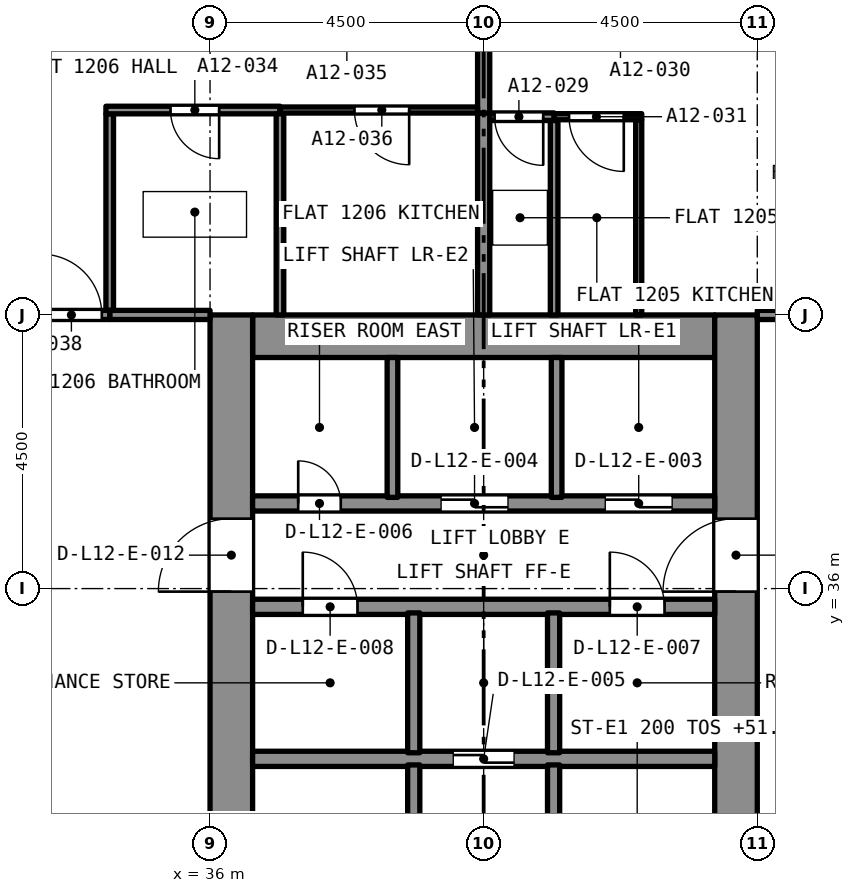
"""IFC4 building model, lengths in metres.
Left out: names, types, materials, properties, quantities, classifications, styles, units other than length and angle.
Written with IfcOpenShell. Run it as: python <this file> out.ifc"""

import sys

from ifc_helpers import new_model, si_unit, direction, frame, frame_2d, origin, place, context, subcontext, project, spatial, rectangle, extrude, element, fill, save


model = new_model("IFC4")
c1 = context("Model", 3, precision=1e-05, world=origin(), true_north=direction((0.0, 1.0)))
c2 = subcontext(c1, "Body", "Model", "MODEL_VIEW")
j1 = project(units=[si_unit("LENGTHUNIT", "METRE"), si_unit("PLANEANGLEUNIT", "RADIAN")], contexts=[c1])
p1 = place(None, origin())
s1 = spatial("IfcSite", under=j1, at=p1, CompositionType="ELEMENT")
p2 = place(p1, origin())
s2 = spatial("IfcBuilding", under=s1, at=p2, CompositionType="ELEMENT")
p3 = place(p2, frame((0.0, 0.0, 49.6)))
s3 = spatial("IfcBuildingStorey", under=s2, at=p3, CompositionType="ELEMENT", Elevation=49.6)
p4 = place(p3, frame((36.7, 40.15, 0.0), z_axis=(0.0, 0.0, 1.0), x_axis=(1.0, 0.0, 0.0)))
e1 = element("IfcWall", 1, at=p4, inside=s3, PredefinedType="SOLIDWALL", context=c2, shape_type="SweptSolid", body=[
    extrude(rectangle(XDim=7.6, YDim=0.7, at=frame_2d((3.8, 0.0))), origin(), (0.0, 0.0, 1.0), 3.2),
])
p5 = place(p3, frame((36.35, 27.0, 0.0), z_axis=(0.0, 0.0, 1.0), x_axis=(0.0, 1.0, 0.0)))
e2 = element("IfcWall", 2, at=p5, inside=s3, PredefinedType="SOLIDWALL", context=c2, shape_type="SweptSolid", body=[
    extrude(rectangle(XDim=13.5, YDim=0.7, at=frame_2d((6.75, 0.0))), origin(), (0.0, 0.0, 1.0), 3.2),
])
p6 = place(p5, frame((8.95, 0.0, 0.0)))
e3 = element("IfcOpeningElement", 3, at=p6, cuts=e2, PredefinedType="OPENING", context=c2, shape_type="SweptSolid", body=[
    extrude(rectangle(XDim=1.2, YDim=2.1, at=frame_2d((0.6, 1.05))), frame((0.0, 0.36, 0.0), z_axis=(0.0, -1.0, 0.0), x_axis=(1.0, 0.0, 0.0)), (0.0, 0.0, 1.0), 0.72),
])
p7 = place(p3, frame((44.65, 27.0, 0.0), z_axis=(0.0, 0.0, 1.0), x_axis=(0.0, 1.0, 0.0)))
e4 = element("IfcWall", 4, at=p7, inside=s3, PredefinedType="SOLIDWALL", context=c2, shape_type="SweptSolid", body=[
    extrude(rectangle(XDim=13.5, YDim=0.7, at=frame_2d((6.75, 0.0))), origin(), (0.0, 0.0, 1.0), 3.2),
])
p8 = place(p7, frame((8.95, 0.0, 0.0)))
e5 = element("IfcOpeningElement", 5, at=p8, cuts=e4, PredefinedType="OPENING", context=c2, shape_type="SweptSolid", body=[
    extrude(rectangle(XDim=1.2, YDim=2.1, at=frame_2d((0.6, 1.05))), frame((0.0, 0.36, 0.0), z_axis=(0.0, -1.0, 0.0), x_axis=(1.0, 0.0, 0.0)), (0.0, 0.0, 1.0), 0.72),
])
p9 = place(p3, frame((41.659, 43.76, 0.0), z_axis=(0.0, 0.0, 1.0), x_axis=(-1.0, 0.0, 0.0)))
e6 = element("IfcWall", 6, at=p9, inside=s3, PredefinedType="PARTITIONING", context=c2, shape_type="SweptSolid", body=[
    extrude(rectangle(XDim=1.059, YDim=0.125, at=frame_2d((0.53, 0.0))), origin(), (0.0, 0.0, 1.0), 2.9),
])
p10 = place(p9, frame((0.179, 0.0, 0.0)))
e7 = element("IfcOpeningElement", 7, at=p10, cuts=e6, PredefinedType="OPENING", context=c2, shape_type="SweptSolid", body=[
    extrude(rectangle(XDim=0.8, YDim=2.1, at=frame_2d((0.4, 1.05))), frame((0.0, 0.073, 0.0), z_axis=(0.0, -1.0, 0.0), x_axis=(1.0, 0.0, 0.0)), (0.0, 0.0, 1.0), 0.145),
])
p11 = place(p3, frame((41.659, 40.5, 0.0), z_axis=(0.0, 0.0, 1.0), x_axis=(0.0, 1.0, 0.0)))
e8 = element("IfcWall", 8, at=p11, inside=s3, PredefinedType="PARTITIONING", context=c2, shape_type="SweptSolid", body=[
    extrude(rectangle(XDim=3.198, YDim=0.125, at=frame_2d((1.599, 0.0))), origin(), (0.0, 0.0, 1.0), 2.9),
])
p12 = place(p3, frame((40.5, 40.5, 0.0), z_axis=(0.0, 0.0, 1.0), x_axis=(0.0, 1.0, 0.0)))
e9 = element("IfcWall", 9, at=p12, inside=s3, PredefinedType="PARTITIONING", context=c2, shape_type="SweptSolid", body=[
    extrude(rectangle(XDim=3.323, YDim=0.2, at=frame_2d((1.661, 0.0))), origin(), (0.0, 0.0, 1.0), 2.9),
])
p13 = place(p3, frame((43.05, 40.5, 0.0), z_axis=(0.0, 0.0, 1.0), x_axis=(0.0, 1.0, 0.0)))
e10 = element("IfcWall", 10, at=p13, inside=s3, PredefinedType="PARTITIONING", context=c2, shape_type="SweptSolid", body=[
    extrude(rectangle(XDim=3.21, YDim=0.1, at=frame_2d((1.605, 0.0))), origin(), (0.0, 0.0, 1.0), 2.9),
])
p14 = place(p3, frame((43.1, 43.76, 0.0), z_axis=(0.0, 0.0, 1.0), x_axis=(-1.0, 0.0, 0.0)))
e11 = element("IfcWall", 11, at=p14, inside=s3, PredefinedType="PARTITIONING", context=c2, shape_type="SweptSolid", body=[
    extrude(rectangle(XDim=1.441, YDim=0.1, at=frame_2d((0.72, 0.0))), origin(), (0.0, 0.0, 1.0), 2.9),
])
p15 = place(p14, frame((0.295, 0.0, 0.0)))
e12 = element("IfcOpeningElement", 12, at=p15, cuts=e11, PredefinedType="OPENING", context=c2, shape_type="SweptSolid", body=[
    extrude(rectangle(XDim=0.9, YDim=2.1, at=frame_2d((0.45, 1.05))), frame((0.0, 0.06, 0.0), z_axis=(0.0, -1.0, 0.0), x_axis=(1.0, 0.0, 0.0)), (0.0, 0.0, 1.0), 0.12),
])
p16 = place(p3, frame((40.5, 43.82, 0.0), z_axis=(0.0, 0.0, 1.0), x_axis=(0.0, 1.0, 0.0)))
e13 = element("IfcWall", 13, at=p16, inside=s3, PredefinedType="PARTITIONING", context=c2, shape_type="SweptSolid", body=[
    extrude(rectangle(XDim=1.23, YDim=0.2, at=frame_2d((0.615, 0.0))), origin(), (0.0, 0.0, 1.0), 2.9),
])
p17 = place(p3, frame((45.0, 40.5, 0.0), z_axis=(0.0, 0.0, 1.0), x_axis=(1.0, 0.0, 0.0)))
e14 = element("IfcWall", 14, at=p17, inside=s3, PredefinedType="PARTITIONING", context=c2, shape_type="SweptSolid", body=[
    extrude(rectangle(XDim=3.8, YDim=0.15, at=frame_2d((1.9, 0.0))), origin(), (0.0, 0.0, 1.0), 2.9),
])
p18 = place(p17, frame((1.75, 0.0, 0.0)))
e15 = element("IfcOpeningElement", 15, at=p18, cuts=e14, PredefinedType="OPENING", context=c2, shape_type="SweptSolid", body=[
    extrude(rectangle(XDim=1.0, YDim=2.1, at=frame_2d((0.5, 1.05))), frame((0.0, 0.085, 0.0), z_axis=(0.0, -1.0, 0.0), x_axis=(1.0, 0.0, 0.0)), (0.0, 0.0, 1.0), 0.17),
])
p19 = place(p3, frame((34.35, 40.575, 0.0), z_axis=(0.0, 0.0, 1.0), x_axis=(0.0, 1.0, 0.0)))
e16 = element("IfcWall", 16, at=p19, inside=s3, PredefinedType="PARTITIONING", context=c2, shape_type="SweptSolid", body=[
    extrude(rectangle(XDim=3.233, YDim=0.125, at=frame_2d((1.616, 0.0))), origin(), (0.0, 0.0, 1.0), 2.9),
])
p20 = place(p3, frame((37.15, 43.87, 0.0), z_axis=(0.0, 0.0, 1.0), x_axis=(-1.0, 0.0, 0.0)))
e17 = element("IfcWall", 17, at=p20, inside=s3, PredefinedType="PARTITIONING", context=c2, shape_type="SweptSolid", body=[
    extrude(rectangle(XDim=2.862, YDim=0.125, at=frame_2d((1.431, 0.0))), origin(), (0.0, 0.0, 1.0), 2.9),
])
p21 = place(p20, frame((1.0, 0.0, 0.0)))
e18 = element("IfcOpeningElement", 18, at=p21, cuts=e17, PredefinedType="OPENING", context=c2, shape_type="SweptSolid", body=[
    extrude(rectangle(XDim=0.8, YDim=2.1, at=frame_2d((0.4, 1.05))), frame((0.0, 0.073, 0.0), z_axis=(0.0, -1.0, 0.0), x_axis=(1.0, 0.0, 0.0)), (0.0, 0.0, 1.0), 0.145),
])
p22 = place(p3, frame((37.15, 40.5, 0.0), z_axis=(0.0, 0.0, 1.0), x_axis=(0.0, 1.0, 0.0)))
e19 = element("IfcWall", 19, at=p22, inside=s3, PredefinedType="PARTITIONING", context=c2, shape_type="SweptSolid", body=[
    extrude(rectangle(XDim=3.308, YDim=0.125, at=frame_2d((1.654, 0.0))), origin(), (0.0, 0.0, 1.0), 2.9),
])
p23 = place(p3, frame((34.35, 40.5, 0.0), z_axis=(0.0, 0.0, 1.0), x_axis=(1.0, 0.0, 0.0)))
e20 = element("IfcWall", 20, at=p23, inside=s3, PredefinedType="PARTITIONING", context=c2, shape_type="SweptSolid", body=[
    extrude(rectangle(XDim=1.65, YDim=0.15, at=frame_2d((0.825, 0.0))), origin(), (0.0, 0.0, 1.0), 2.9),
])
p24 = place(p3, frame((40.4, 43.87, 0.0), z_axis=(0.0, 0.0, 1.0), x_axis=(-1.0, 0.0, 0.0)))
e21 = element("IfcWall", 21, at=p24, inside=s3, PredefinedType="PARTITIONING", context=c2, shape_type="SweptSolid", body=[
    extrude(rectangle(XDim=3.25, YDim=0.1, at=frame_2d((1.625, 0.0))), origin(), (0.0, 0.0, 1.0), 2.9),
])
p25 = place(p24, frame((1.125, 0.0, 0.0)))
e22 = element("IfcOpeningElement", 22, at=p25, cuts=e21, PredefinedType="OPENING", context=c2, shape_type="SweptSolid", body=[
    extrude(rectangle(XDim=0.9, YDim=2.1, at=frame_2d((0.45, 1.05))), frame((0.0, 0.06, 0.0), z_axis=(0.0, -1.0, 0.0), x_axis=(1.0, 0.0, 0.0)), (0.0, 0.0, 1.0), 0.12),
])
p26 = place(p3, frame((32.2, 40.5, 0.0), z_axis=(0.0, 0.0, 1.0), x_axis=(1.0, 0.0, 0.0)))
e23 = element("IfcWall", 23, at=p26, inside=s3, PredefinedType="PARTITIONING", context=c2, shape_type="SweptSolid", body=[
    extrude(rectangle(XDim=2.15, YDim=0.15, at=frame_2d((1.075, 0.0))), origin(), (0.0, 0.0, 1.0), 2.9),
])
p27 = place(p26, frame((1.02, 0.0, 0.0)))
e24 = element("IfcOpeningElement", 24, at=p27, cuts=e23, PredefinedType="OPENING", context=c2, shape_type="SweptSolid", body=[
    extrude(rectangle(XDim=1.0, YDim=2.1, at=frame_2d((0.5, 1.05))), frame((0.0, 0.085, 0.0), z_axis=(0.0, -1.0, 0.0), x_axis=(1.0, 0.0, 0.0)), (0.0, 0.0, 1.0), 0.17),
])
p28 = place(p3, frame((36.7, 33.2, 0.0), z_axis=(0.0, 0.0, 1.0), x_axis=(1.0, 0.0, 0.0)))
e25 = element("IfcWall", 25, at=p28, inside=s3, PredefinedType="SOLIDWALL", context=c2, shape_type="SweptSolid", body=[
    extrude(rectangle(XDim=7.6, YDim=0.25, at=frame_2d((3.8, 0.0))), origin(), (0.0, 0.0, 1.0), 2.9),
])
p29 = place(p28, frame((3.3, 0.0, 0.0)))
e26 = element("IfcOpeningElement", 26, at=p29, cuts=e25, PredefinedType="OPENING", context=c2, shape_type="SweptSolid", body=[
    extrude(rectangle(XDim=1.0, YDim=2.1, at=frame_2d((0.5, 1.05))), frame((0.0, 0.135, 0.0), z_axis=(0.0, -1.0, 0.0), x_axis=(1.0, 0.0, 0.0)), (0.0, 0.0, 1.0), 0.27),
])
p30 = place(p3, frame((36.7, 35.7, 0.0), z_axis=(0.0, 0.0, 1.0), x_axis=(1.0, 0.0, 0.0)))
e27 = element("IfcWall", 27, at=p30, inside=s3, PredefinedType="SOLIDWALL", context=c2, shape_type="SweptSolid", body=[
    extrude(rectangle(XDim=7.6, YDim=0.25, at=frame_2d((3.8, 0.0))), origin(), (0.0, 0.0, 1.0), 2.9),
])
p31 = place(p30, frame((5.875, 0.0, 0.0)))
e28 = element("IfcOpeningElement", 28, at=p31, cuts=e27, PredefinedType="OPENING", context=c2, shape_type="SweptSolid", body=[
    extrude(rectangle(XDim=0.9, YDim=2.1, at=frame_2d((0.45, 1.05))), frame((0.0, 0.135, 0.0), z_axis=(0.0, -1.0, 0.0), x_axis=(1.0, 0.0, 0.0)), (0.0, 0.0, 1.0), 0.27),
])
p32 = place(p30, frame((0.825, 0.0, 0.0)))
e29 = element("IfcOpeningElement", 29, at=p32, cuts=e27, PredefinedType="OPENING", context=c2, shape_type="SweptSolid", body=[
    extrude(rectangle(XDim=0.9, YDim=2.1, at=frame_2d((0.45, 1.05))), frame((0.0, 0.135, 0.0), z_axis=(0.0, -1.0, 0.0), x_axis=(1.0, 0.0, 0.0)), (0.0, 0.0, 1.0), 0.27),
])
p33 = place(p3, frame((36.7, 37.4, 0.0), z_axis=(0.0, 0.0, 1.0), x_axis=(1.0, 0.0, 0.0)))
e30 = element("IfcWall", 30, at=p33, inside=s3, PredefinedType="SOLIDWALL", context=c2, shape_type="SweptSolid", body=[
    extrude(rectangle(XDim=7.6, YDim=0.25, at=frame_2d((3.8, 0.0))), origin(), (0.0, 0.0, 1.0), 2.9),
])
p34 = place(p33, frame((5.8, 0.0, 0.0)))
e31 = element("IfcOpeningElement", 31, at=p34, cuts=e30, PredefinedType="OPENING", context=c2, shape_type="SweptSolid", body=[
    extrude(rectangle(XDim=1.1, YDim=2.4, at=frame_2d((0.55, 1.2))), frame((0.0, 0.135, 0.0), z_axis=(0.0, -1.0, 0.0), x_axis=(1.0, 0.0, 0.0)), (0.0, 0.0, 1.0), 0.27),
])
p35 = place(p33, frame((3.1, 0.0, 0.0)))
e32 = element("IfcOpeningElement", 32, at=p35, cuts=e30, PredefinedType="OPENING", context=c2, shape_type="SweptSolid", body=[
    extrude(rectangle(XDim=1.1, YDim=2.4, at=frame_2d((0.55, 1.2))), frame((0.0, 0.135, 0.0), z_axis=(0.0, -1.0, 0.0), x_axis=(1.0, 0.0, 0.0)), (0.0, 0.0, 1.0), 0.27),
])
p36 = place(p33, frame((0.75, 0.0, 0.0)))
e33 = element("IfcOpeningElement", 33, at=p36, cuts=e30, PredefinedType="OPENING", context=c2, shape_type="SweptSolid", body=[
    extrude(rectangle(XDim=0.7, YDim=2.1, at=frame_2d((0.35, 1.05))), frame((0.0, 0.135, 0.0), z_axis=(0.0, -1.0, 0.0), x_axis=(1.0, 0.0, 0.0)), (0.0, 0.0, 1.0), 0.27),
])
p37 = place(p3, frame((41.65, 27.7, 0.0), z_axis=(0.0, 0.0, 1.0), x_axis=(0.0, 1.0, 0.0)))
e34 = element("IfcWall", 34, at=p37, inside=s3, PredefinedType="SOLIDWALL", context=c2, shape_type="SweptSolid", body=[
    extrude(rectangle(XDim=5.4, YDim=0.2, at=frame_2d((2.7, 0.0))), origin(), (0.0, 0.0, 1.0), 2.9),
])
p38 = place(p37, frame((0.2, 0.0, 0.0)))
e35 = element("IfcOpeningElement", 35, at=p38, cuts=e34, PredefinedType="OPENING", context=c2, shape_type="SweptSolid", body=[
    extrude(rectangle(XDim=0.9, YDim=2.1, at=frame_2d((0.45, 1.05))), frame((0.0, 0.11, 0.0), z_axis=(0.0, -1.0, 0.0), x_axis=(1.0, 0.0, 0.0)), (0.0, 0.0, 1.0), 0.22),
])
p39 = place(p3, frame((39.35, 27.7, 0.0), z_axis=(0.0, 0.0, 1.0), x_axis=(0.0, 1.0, 0.0)))
e36 = element("IfcWall", 36, at=p39, inside=s3, PredefinedType="SOLIDWALL", context=c2, shape_type="SweptSolid", body=[
    extrude(rectangle(XDim=5.4, YDim=0.2, at=frame_2d((2.7, 0.0))), origin(), (0.0, 0.0, 1.0), 2.9),
])
p40 = place(p39, frame((0.2, 0.0, 0.0)))
e37 = element("IfcOpeningElement", 37, at=p40, cuts=e36, PredefinedType="OPENING", context=c2, shape_type="SweptSolid", body=[
    extrude(rectangle(XDim=0.9, YDim=2.1, at=frame_2d((0.45, 1.05))), frame((0.0, 0.11, 0.0), z_axis=(0.0, -1.0, 0.0), x_axis=(1.0, 0.0, 0.0)), (0.0, 0.0, 1.0), 0.22),
])
for number, where, z_axis, x_axis in (
    (38, (41.65, 33.3, 0.0), (0.0, 0.0, 1.0), (0.0, 1.0, 0.0)),
    (39, (39.35, 33.3, 0.0), (0.0, 0.0, 1.0), (0.0, 1.0, 0.0)),
):
    element("IfcWall", number, at=place(p3, frame(where, z_axis=z_axis, x_axis=x_axis)), inside=s3, PredefinedType="SOLIDWALL", context=c2, shape_type="SweptSolid", body=[
        extrude(rectangle(XDim=2.3, YDim=0.2, at=frame_2d((1.15, 0.0))), origin(), (0.0, 0.0, 1.0), 2.9),
    ])
for number, where, z_axis, x_axis in (
    (40, (41.7, 37.5, 0.0), (0.0, 0.0, 1.0), (0.0, 1.0, 0.0)),
    (41, (39.0, 37.5, 0.0), (0.0, 0.0, 1.0), (0.0, 1.0, 0.0)),
):
    element("IfcWall", number, at=place(p3, frame(where, z_axis=z_axis, x_axis=x_axis)), inside=s3, PredefinedType="SOLIDWALL", context=c2, shape_type="SweptSolid", body=[
        extrude(rectangle(XDim=2.3, YDim=0.175, at=frame_2d((1.15, 0.0))), origin(), (0.0, 0.0, 1.0), 2.9),
    ])
p41 = place(p10, origin())
e42 = element("IfcDoor", 42, at=p41, inside=s3, OperationType="SINGLE_SWING_RIGHT", PredefinedType="DOOR", context=c2, shape_type="SweptSolid", body=[
    extrude(rectangle(XDim=0.8, YDim=2.1, at=frame_2d((0.4, 1.05))), frame((0.0, 0.025, 0.0), z_axis=(0.0, -1.0, 0.0), x_axis=(1.0, 0.0, 0.0)), (0.0, 0.0, 1.0), 0.05),
])
fill(e7, e42)
p42 = place(p15, origin())
e43 = element("IfcDoor", 43, at=p42, inside=s3, OperationType="SINGLE_SWING_RIGHT", PredefinedType="DOOR", context=c2, shape_type="SweptSolid", body=[
    extrude(rectangle(XDim=0.9, YDim=2.1, at=frame_2d((0.45, 1.05))), frame((0.0, 0.025, 0.0), z_axis=(0.0, -1.0, 0.0), x_axis=(1.0, 0.0, 0.0)), (0.0, 0.0, 1.0), 0.05),
])
fill(e12, e43)
p43 = place(p21, origin())
e44 = element("IfcDoor", 44, at=p43, inside=s3, OperationType="SINGLE_SWING_LEFT", PredefinedType="DOOR", context=c2, shape_type="SweptSolid", body=[
    extrude(rectangle(XDim=0.8, YDim=2.1, at=frame_2d((0.4, 1.05))), frame((0.0, 0.025, 0.0), z_axis=(0.0, -1.0, 0.0), x_axis=(1.0, 0.0, 0.0)), (0.0, 0.0, 1.0), 0.05),
])
fill(e18, e44)
p44 = place(p25, origin())
e45 = element("IfcDoor", 45, at=p44, inside=s3, OperationType="SINGLE_SWING_LEFT", PredefinedType="DOOR", context=c2, shape_type="SweptSolid", body=[
    extrude(rectangle(XDim=0.9, YDim=2.1, at=frame_2d((0.45, 1.05))), frame((0.0, 0.025, 0.0), z_axis=(0.0, -1.0, 0.0), x_axis=(1.0, 0.0, 0.0)), (0.0, 0.0, 1.0), 0.05),
])
fill(e22, e45)
p45 = place(p27, origin())
e46 = element("IfcDoor", 46, at=p45, inside=s3, OperationType="SINGLE_SWING_RIGHT", PredefinedType="DOOR", context=c2, shape_type="SweptSolid", body=[
    extrude(rectangle(XDim=1.0, YDim=2.1, at=frame_2d((0.5, 1.05))), frame((0.0, 0.025, 0.0), z_axis=(0.0, -1.0, 0.0), x_axis=(1.0, 0.0, 0.0)), (0.0, 0.0, 1.0), 0.05),
])
fill(e24, e46)
p46 = place(p34, origin())
e47 = element("IfcDoor", 47, at=p46, inside=s3, OperationType="SLIDING_TO_LEFT", PredefinedType="DOOR", context=c2, shape_type="SweptSolid", body=[
    extrude(rectangle(XDim=1.1, YDim=2.4, at=frame_2d((0.55, 1.2))), frame((0.0, 0.025, 0.0), z_axis=(0.0, -1.0, 0.0), x_axis=(1.0, 0.0, 0.0)), (0.0, 0.0, 1.0), 0.05),
])
fill(e31, e47)
p47 = place(p35, origin())
e48 = element("IfcDoor", 48, at=p47, inside=s3, OperationType="SLIDING_TO_LEFT", PredefinedType="DOOR", context=c2, shape_type="SweptSolid", body=[
    extrude(rectangle(XDim=1.1, YDim=2.4, at=frame_2d((0.55, 1.2))), frame((0.0, 0.025, 0.0), z_axis=(0.0, -1.0, 0.0), x_axis=(1.0, 0.0, 0.0)), (0.0, 0.0, 1.0), 0.05),
])
fill(e32, e48)
p48 = place(p29, origin())
e49 = element("IfcDoor", 49, at=p48, inside=s3, OperationType="SLIDING_TO_LEFT", PredefinedType="DOOR", context=c2, shape_type="SweptSolid", body=[
    extrude(rectangle(XDim=1.0, YDim=2.1, at=frame_2d((0.5, 1.05))), frame((0.0, 0.025, 0.0), z_axis=(0.0, -1.0, 0.0), x_axis=(1.0, 0.0, 0.0)), (0.0, 0.0, 1.0), 0.05),
])
fill(e26, e49)
p49 = place(p36, origin())
e50 = element("IfcDoor", 50, at=p49, inside=s3, OperationType="SINGLE_SWING_LEFT", PredefinedType="DOOR", context=c2, shape_type="SweptSolid", body=[
    extrude(rectangle(XDim=0.7, YDim=2.1, at=frame_2d((0.35, 1.05))), frame((0.0, 0.025, 0.0), z_axis=(0.0, -1.0, 0.0), x_axis=(1.0, 0.0, 0.0)), (0.0, 0.0, 1.0), 0.05),
])
fill(e33, e50)
p50 = place(p31, origin())
e51 = element("IfcDoor", 51, at=p50, inside=s3, OperationType="SINGLE_SWING_LEFT", PredefinedType="DOOR", context=c2, shape_type="SweptSolid", body=[
    extrude(rectangle(XDim=0.9, YDim=2.1, at=frame_2d((0.45, 1.05))), frame((0.0, 0.025, 0.0), z_axis=(0.0, -1.0, 0.0), x_axis=(1.0, 0.0, 0.0)), (0.0, 0.0, 1.0), 0.05),
])
fill(e28, e51)
p51 = place(p32, origin())
e52 = element("IfcDoor", 52, at=p51, inside=s3, OperationType="SINGLE_SWING_LEFT", PredefinedType="DOOR", context=c2, shape_type="SweptSolid", body=[
    extrude(rectangle(XDim=0.9, YDim=2.1, at=frame_2d((0.45, 1.05))), frame((0.0, 0.025, 0.0), z_axis=(0.0, -1.0, 0.0), x_axis=(1.0, 0.0, 0.0)), (0.0, 0.0, 1.0), 0.05),
])
fill(e29, e52)
p52 = place(p6, origin())
e53 = element("IfcDoor", 53, at=p52, inside=s3, OperationType="SINGLE_SWING_LEFT", PredefinedType="DOOR", context=c2, shape_type="SweptSolid", body=[
    extrude(rectangle(XDim=1.2, YDim=2.1, at=frame_2d((0.6, 1.05))), frame((0.0, 0.025, 0.0), z_axis=(0.0, -1.0, 0.0), x_axis=(1.0, 0.0, 0.0)), (0.0, 0.0, 1.0), 0.05),
])
fill(e3, e53)
p53 = place(p8, origin())
e54 = element("IfcDoor", 54, at=p53, inside=s3, OperationType="SINGLE_SWING_LEFT", PredefinedType="DOOR", context=c2, shape_type="SweptSolid", body=[
    extrude(rectangle(XDim=1.2, YDim=2.1, at=frame_2d((0.6, 1.05))), frame((0.0, 0.025, 0.0), z_axis=(0.0, -1.0, 0.0), x_axis=(1.0, 0.0, 0.0)), (0.0, 0.0, 1.0), 0.05),
])
fill(e5, e54)
save(model, sys.argv[1])
